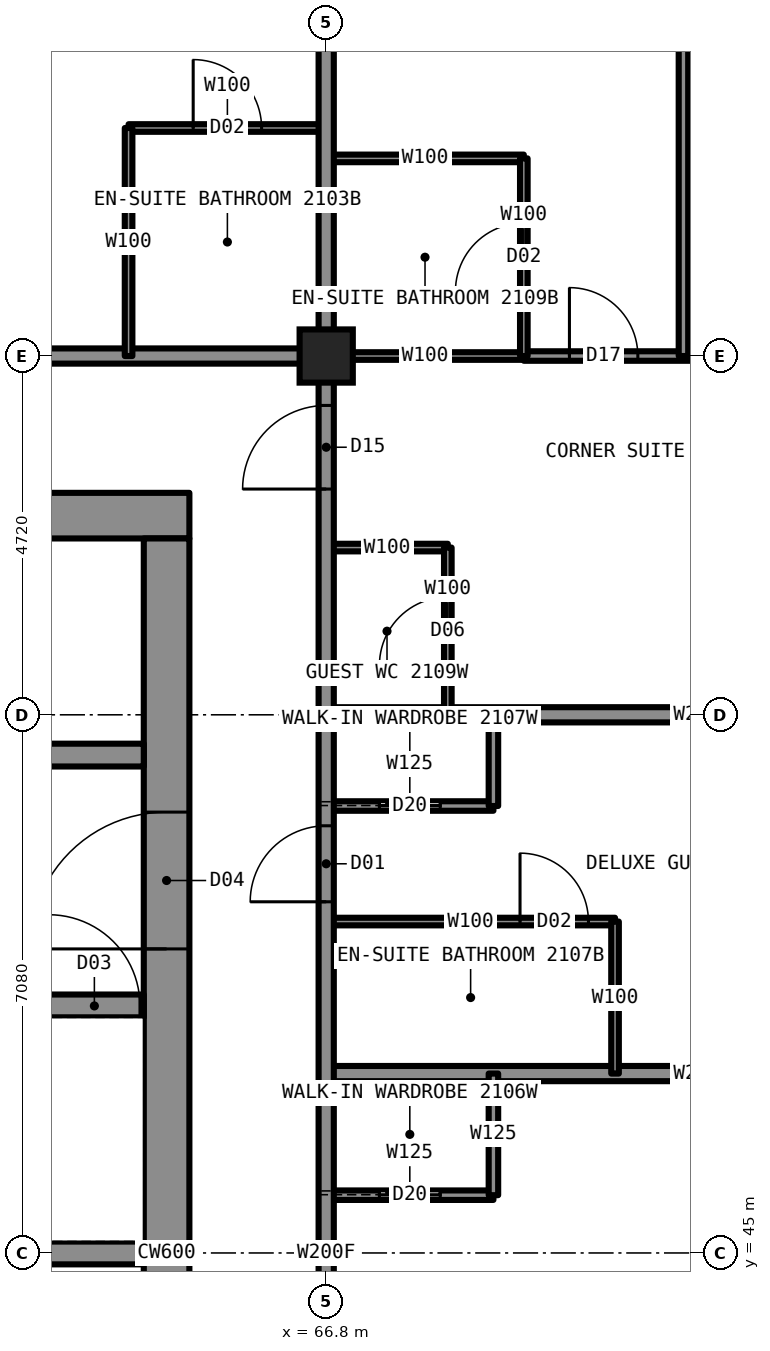
"""IFC4 building model, lengths in metres.
Left out: names, types, materials, properties, quantities, classifications, styles, units other than length and angle.
Written with IfcOpenShell. Run it as: python <this file> out.ifc"""

import sys

from ifc_helpers import new_model, si_unit, direction, frame, frame_2d, origin, origin_2d, place, context, subcontext, project, spatial, rectangle, hollow_rectangle, extrude, element, fill, save


model = new_model("IFC4")
c1 = context("Model", 3, precision=1e-05, world=origin(), true_north=direction((0.0, 1.0)))
c2 = subcontext(c1, "Body", "Model", "MODEL_VIEW")
j1 = project(units=[si_unit("LENGTHUNIT", "METRE"), si_unit("PLANEANGLEUNIT", "RADIAN")], contexts=[c1])
p1 = place(None, origin())
s1 = spatial("IfcSite", under=j1, at=p1, CompositionType="ELEMENT")
p2 = place(p1, origin())
s2 = spatial("IfcBuilding", under=s1, at=p2, CompositionType="ELEMENT")
p3 = place(p2, frame((0.0, 0.0, 81.0)))
s3 = spatial("IfcBuildingStorey", under=s2, at=p3, CompositionType="ELEMENT", Elevation=81.0)
p4 = place(p3, frame((66.8, 56.8, 0.0), z_axis=(0.0, 0.0, 1.0), x_axis=(1.0, 0.0, 0.0)))
e1 = element("IfcColumn", 1, at=p4, inside=s3, PredefinedType="COLUMN", context=c2, shape_type="SweptSolid", body=[
    extrude(hollow_rectangle(XDim=0.7, YDim=0.7, WallThickness=0.06, at=origin_2d()), origin(), (0.0, 0.0, 1.0), 3.5),
])
p5 = place(p3, frame((45.0, 54.7, 0.0), z_axis=(0.0, 0.0, 1.0), x_axis=(1.0, 0.0, 0.0)))
e2 = element("IfcWall", 2, at=p5, inside=s3, PredefinedType="SHEAR", context=c2, shape_type="SweptSolid", body=[
    extrude(rectangle(XDim=20.0, YDim=0.6, at=frame_2d((10.0, 0.0))), origin(), (0.0, 0.0, 1.0), 3.5),
])
p6 = place(p3, frame((64.7, 35.6, 0.0), z_axis=(0.0, 0.0, 1.0), x_axis=(0.0, 1.0, 0.0)))
e3 = element("IfcWall", 3, at=p6, inside=s3, PredefinedType="SHEAR", context=c2, shape_type="SweptSolid", body=[
    extrude(rectangle(XDim=18.8, YDim=0.6, at=frame_2d((9.4, 0.0))), origin(), (0.0, 0.0, 1.0), 3.5),
])
p7 = place(p6, frame((13.4, 0.0, 0.0)))
e4 = element("IfcOpeningElement", 4, at=p7, cuts=e3, PredefinedType="OPENING", context=c2, shape_type="SweptSolid", body=[
    extrude(rectangle(XDim=1.8, YDim=2.2, at=frame_2d((0.9, 1.1))), frame((0.0, 0.31, 0.0), z_axis=(0.0, -1.0, 0.0), x_axis=(1.0, 0.0, 0.0)), (0.0, 0.0, 1.0), 0.62),
])
p8 = place(p6, frame((3.6, 0.0, 0.0)))
e5 = element("IfcOpeningElement", 5, at=p8, cuts=e3, PredefinedType="OPENING", context=c2, shape_type="SweptSolid", body=[
    extrude(rectangle(XDim=1.8, YDim=2.2, at=frame_2d((0.9, 1.1))), frame((0.0, 0.31, 0.0), z_axis=(0.0, -1.0, 0.0), x_axis=(1.0, 0.0, 0.0)), (0.0, 0.0, 1.0), 0.62),
])
p9 = place(p3, frame((45.6, 51.55, 0.0), z_axis=(0.0, 0.0, 1.0), x_axis=(1.0, 0.0, 0.0)))
e6 = element("IfcWall", 6, at=p9, inside=s3, PredefinedType="SHEAR", context=c2, shape_type="SweptSolid", body=[
    extrude(rectangle(XDim=18.8, YDim=0.3, at=frame_2d((9.4, 0.0))), origin(), (0.0, 0.0, 1.0), 3.5),
])
p10 = place(p9, frame((0.7, 0.0, 0.0)))
e7 = element("IfcOpeningElement", 7, at=p10, cuts=e6, PredefinedType="OPENING", context=c2, shape_type="SweptSolid", body=[
    extrude(rectangle(XDim=1.1, YDim=2.2, at=frame_2d((0.55, 1.1))), frame((0.0, 0.16, 0.0), z_axis=(0.0, -1.0, 0.0), x_axis=(1.0, 0.0, 0.0)), (0.0, 0.0, 1.0), 0.32),
])
p11 = place(p9, frame((3.4, 0.0, 0.0)))
e8 = element("IfcOpeningElement", 8, at=p11, cuts=e6, PredefinedType="OPENING", context=c2, shape_type="SweptSolid", body=[
    extrude(rectangle(XDim=1.1, YDim=2.2, at=frame_2d((0.55, 1.1))), frame((0.0, 0.16, 0.0), z_axis=(0.0, -1.0, 0.0), x_axis=(1.0, 0.0, 0.0)), (0.0, 0.0, 1.0), 0.32),
])
p12 = place(p9, frame((6.1, 0.0, 0.0)))
e9 = element("IfcOpeningElement", 9, at=p12, cuts=e6, PredefinedType="OPENING", context=c2, shape_type="SweptSolid", body=[
    extrude(rectangle(XDim=1.1, YDim=2.2, at=frame_2d((0.55, 1.1))), frame((0.0, 0.16, 0.0), z_axis=(0.0, -1.0, 0.0), x_axis=(1.0, 0.0, 0.0)), (0.0, 0.0, 1.0), 0.32),
])
p13 = place(p9, frame((8.8, 0.0, 0.0)))
e10 = element("IfcOpeningElement", 10, at=p13, cuts=e6, PredefinedType="OPENING", context=c2, shape_type="SweptSolid", body=[
    extrude(rectangle(XDim=1.1, YDim=2.2, at=frame_2d((0.55, 1.1))), frame((0.0, 0.16, 0.0), z_axis=(0.0, -1.0, 0.0), x_axis=(1.0, 0.0, 0.0)), (0.0, 0.0, 1.0), 0.32),
])
p14 = place(p9, frame((11.6, 0.0, 0.0)))
e11 = element("IfcOpeningElement", 11, at=p14, cuts=e6, PredefinedType="OPENING", context=c2, shape_type="SweptSolid", body=[
    extrude(rectangle(XDim=1.1, YDim=2.2, at=frame_2d((0.55, 1.1))), frame((0.0, 0.16, 0.0), z_axis=(0.0, -1.0, 0.0), x_axis=(1.0, 0.0, 0.0)), (0.0, 0.0, 1.0), 0.32),
])
p15 = place(p9, frame((14.3, 0.0, 0.0)))
e12 = element("IfcOpeningElement", 12, at=p15, cuts=e6, PredefinedType="OPENING", context=c2, shape_type="SweptSolid", body=[
    extrude(rectangle(XDim=1.1, YDim=2.2, at=frame_2d((0.55, 1.1))), frame((0.0, 0.16, 0.0), z_axis=(0.0, -1.0, 0.0), x_axis=(1.0, 0.0, 0.0)), (0.0, 0.0, 1.0), 0.32),
])
p16 = place(p3, frame((56.2, 48.25, 0.0), z_axis=(0.0, 0.0, 1.0), x_axis=(1.0, 0.0, 0.0)))
e13 = element("IfcWall", 13, at=p16, inside=s3, PredefinedType="SHEAR", context=c2, shape_type="SweptSolid", body=[
    extrude(rectangle(XDim=8.2, YDim=0.3, at=frame_2d((4.1, 0.0))), origin(), (0.0, 0.0, 1.0), 3.5),
])
p17 = place(p16, frame((6.95, 0.0, 0.0)))
e14 = element("IfcOpeningElement", 14, at=p17, cuts=e13, PredefinedType="OPENING", context=c2, shape_type="SweptSolid", body=[
    extrude(rectangle(XDim=1.2, YDim=2.2, at=frame_2d((0.6, 1.1))), frame((0.0, 0.16, 0.0), z_axis=(0.0, -1.0, 0.0), x_axis=(1.0, 0.0, 0.0)), (0.0, 0.0, 1.0), 0.32),
])
p18 = place(p3, frame((56.5, 45.0, 0.0), z_axis=(0.0, 0.0, 1.0), x_axis=(1.0, 0.0, 0.0)))
e15 = element("IfcWall", 15, at=p18, inside=s3, PredefinedType="SHEAR", context=c2, shape_type="SweptSolid", body=[
    extrude(rectangle(XDim=7.9, YDim=0.3, at=frame_2d((3.95, 0.0))), origin(), (0.0, 0.0, 1.0), 3.5),
])
p19 = place(p3, frame((66.8, 45.76, 0.0), z_axis=(0.0, 0.0, 1.0), x_axis=(1.0, 0.0, 0.0)))
e16 = element("IfcWall", 16, at=p19, inside=s3, PredefinedType="PARTITIONING", context=c2, shape_type="SweptSolid", body=[
    extrude(rectangle(XDim=2.2, YDim=0.125, at=frame_2d((1.1, 0.0))), origin(), (0.0, 0.0, 1.0), 3.33),
])
p20 = place(p19, frame((0.7, 0.0, 0.0)))
e17 = element("IfcOpeningElement", 17, at=p20, cuts=e16, PredefinedType="OPENING", context=c2, shape_type="SweptSolid", body=[
    extrude(rectangle(XDim=0.8, YDim=2.1, at=frame_2d((0.4, 1.05))), frame((0.0, 0.073, 0.0), z_axis=(0.0, -1.0, 0.0), x_axis=(1.0, 0.0, 0.0)), (0.0, 0.0, 1.0), 0.145),
])
p21 = place(p3, frame((66.8, 56.8, 0.0), z_axis=(0.0, 0.0, 1.0), x_axis=(1.0, 0.0, 0.0)))
e18 = element("IfcWall", 18, at=p21, inside=s3, PredefinedType="PARTITIONING", context=c2, shape_type="SweptSolid", body=[
    extrude(rectangle(XDim=2.6, YDim=0.1, at=frame_2d((1.3, 0.0))), origin(), (0.0, 0.0, 1.0), 2.573),
])
p22 = place(p3, frame((43.2, 56.8, 0.0), z_axis=(0.0, 0.0, 1.0), x_axis=(1.0, 0.0, 0.0)))
e19 = element("IfcWall", 19, at=p22, inside=s3, PredefinedType="PARTITIONING", context=c2, shape_type="SweptSolid", body=[
    extrude(rectangle(XDim=23.6, YDim=0.2, at=frame_2d((11.8, 0.0))), origin(), (0.0, 0.0, 1.0), 3.33),
])
p23 = place(p22, frame((0.7, 0.0, 0.0)))
e20 = element("IfcOpeningElement", 20, at=p23, cuts=e19, PredefinedType="OPENING", context=c2, shape_type="SweptSolid", body=[
    extrude(rectangle(XDim=1.0, YDim=2.2, at=frame_2d((0.5, 1.1))), frame((0.0, 0.11, 0.0), z_axis=(0.0, -1.0, 0.0), x_axis=(1.0, 0.0, 0.0)), (0.0, 0.0, 1.0), 0.22),
])
p24 = place(p22, frame((6.98, 0.0, 0.0)))
e21 = element("IfcOpeningElement", 21, at=p24, cuts=e19, PredefinedType="OPENING", context=c2, shape_type="SweptSolid", body=[
    extrude(rectangle(XDim=1.0, YDim=2.2, at=frame_2d((0.5, 1.1))), frame((0.0, 0.11, 0.0), z_axis=(0.0, -1.0, 0.0), x_axis=(1.0, 0.0, 0.0)), (0.0, 0.0, 1.0), 0.22),
])
p25 = place(p22, frame((11.29, 0.0, 0.0)))
e22 = element("IfcOpeningElement", 22, at=p25, cuts=e19, PredefinedType="OPENING", context=c2, shape_type="SweptSolid", body=[
    extrude(rectangle(XDim=1.1, YDim=2.2, at=frame_2d((0.55, 1.1))), frame((0.0, 0.11, 0.0), z_axis=(0.0, -1.0, 0.0), x_axis=(1.0, 0.0, 0.0)), (0.0, 0.0, 1.0), 0.22),
])
p26 = place(p3, frame((69.4, 56.8, 0.0), z_axis=(0.0, 0.0, 1.0), x_axis=(1.0, 0.0, 0.0)))
e23 = element("IfcWall", 23, at=p26, inside=s3, PredefinedType="PARTITIONING", context=c2, shape_type="SweptSolid", body=[
    extrude(rectangle(XDim=7.3, YDim=0.125, at=frame_2d((3.65, 0.0))), origin(), (0.0, 0.0, 1.0), 2.573),
])
p27 = place(p26, frame((0.6, 0.0, 0.0)))
e24 = element("IfcOpeningElement", 24, at=p27, cuts=e23, PredefinedType="OPENING", context=c2, shape_type="SweptSolid", body=[
    extrude(rectangle(XDim=0.9, YDim=2.2, at=frame_2d((0.45, 1.1))), frame((0.0, 0.073, 0.0), z_axis=(0.0, -1.0, 0.0), x_axis=(1.0, 0.0, 0.0)), (0.0, 0.0, 1.0), 0.145),
])
p28 = place(p26, frame((4.4, 0.0, 0.0)))
e25 = element("IfcOpeningElement", 25, at=p28, cuts=e23, PredefinedType="OPENING", context=c2, shape_type="SweptSolid", body=[
    extrude(rectangle(XDim=0.9, YDim=2.2, at=frame_2d((0.45, 1.1))), frame((0.0, 0.073, 0.0), z_axis=(0.0, -1.0, 0.0), x_axis=(1.0, 0.0, 0.0)), (0.0, 0.0, 1.0), 0.145),
])
p29 = place(p3, frame((66.8, 59.4, 0.0), z_axis=(0.0, 0.0, 1.0), x_axis=(1.0, 0.0, 0.0)))
e26 = element("IfcWall", 26, at=p29, inside=s3, PredefinedType="PARTITIONING", context=c2, shape_type="SweptSolid", body=[
    extrude(rectangle(XDim=2.6, YDim=0.1, at=frame_2d((1.3, 0.0))), origin(), (0.0, 0.0, 1.0), 3.33),
])
p30 = place(p3, frame((64.2, 59.8, 0.0), z_axis=(0.0, 0.0, 1.0), x_axis=(1.0, 0.0, 0.0)))
e27 = element("IfcWall", 27, at=p30, inside=s3, PredefinedType="PARTITIONING", context=c2, shape_type="SweptSolid", body=[
    extrude(rectangle(XDim=2.6, YDim=0.1, at=frame_2d((1.3, 0.0))), origin(), (0.0, 0.0, 1.0), 3.33),
])
p31 = place(p30, frame((0.85, 0.0, 0.0)))
e28 = element("IfcOpeningElement", 28, at=p31, cuts=e27, PredefinedType="OPENING", context=c2, shape_type="SweptSolid", body=[
    extrude(rectangle(XDim=0.9, YDim=2.1, at=frame_2d((0.45, 1.05))), frame((0.0, 0.06, 0.0), z_axis=(0.0, -1.0, 0.0), x_axis=(1.0, 0.0, 0.0)), (0.0, 0.0, 1.0), 0.12),
])
p32 = place(p3, frame((66.8, 47.36, 0.0), z_axis=(0.0, 0.0, 1.0), x_axis=(1.0, 0.0, 0.0)))
e29 = element("IfcWall", 29, at=p32, inside=s3, PredefinedType="PARTITIONING", context=c2, shape_type="SweptSolid", body=[
    extrude(rectangle(XDim=9.9, YDim=0.2, at=frame_2d((4.95, 0.0))), origin(), (0.0, 0.0, 1.0), 2.723),
])
p33 = place(p3, frame((66.8, 49.36, 0.0), z_axis=(0.0, 0.0, 1.0), x_axis=(1.0, 0.0, 0.0)))
e30 = element("IfcWall", 30, at=p33, inside=s3, PredefinedType="PARTITIONING", context=c2, shape_type="SweptSolid", body=[
    extrude(rectangle(XDim=3.8, YDim=0.1, at=frame_2d((1.9, 0.0))), origin(), (0.0, 0.0, 1.0), 3.33),
])
p34 = place(p33, frame((2.55, 0.0, 0.0)))
e31 = element("IfcOpeningElement", 31, at=p34, cuts=e30, PredefinedType="OPENING", context=c2, shape_type="SweptSolid", body=[
    extrude(rectangle(XDim=0.9, YDim=2.1, at=frame_2d((0.45, 1.05))), frame((0.0, 0.06, 0.0), z_axis=(0.0, -1.0, 0.0), x_axis=(1.0, 0.0, 0.0)), (0.0, 0.0, 1.0), 0.12),
])
p35 = place(p3, frame((66.8, 50.88, 0.0), z_axis=(0.0, 0.0, 1.0), x_axis=(1.0, 0.0, 0.0)))
e32 = element("IfcWall", 32, at=p35, inside=s3, PredefinedType="PARTITIONING", context=c2, shape_type="SweptSolid", body=[
    extrude(rectangle(XDim=2.2, YDim=0.125, at=frame_2d((1.1, 0.0))), origin(), (0.0, 0.0, 1.0), 3.33),
])
p36 = place(p35, frame((0.7, 0.0, 0.0)))
e33 = element("IfcOpeningElement", 33, at=p36, cuts=e32, PredefinedType="OPENING", context=c2, shape_type="SweptSolid", body=[
    extrude(rectangle(XDim=0.8, YDim=2.1, at=frame_2d((0.4, 1.05))), frame((0.0, 0.073, 0.0), z_axis=(0.0, -1.0, 0.0), x_axis=(1.0, 0.0, 0.0)), (0.0, 0.0, 1.0), 0.145),
])
p37 = place(p3, frame((66.8, 52.08, 0.0), z_axis=(0.0, 0.0, 1.0), x_axis=(1.0, 0.0, 0.0)))
e34 = element("IfcWall", 34, at=p37, inside=s3, PredefinedType="PARTITIONING", context=c2, shape_type="SweptSolid", body=[
    extrude(rectangle(XDim=9.9, YDim=0.2, at=frame_2d((4.95, 0.0))), origin(), (0.0, 0.0, 1.0), 2.573),
])
p38 = place(p3, frame((66.8, 54.28, 0.0), z_axis=(0.0, 0.0, 1.0), x_axis=(1.0, 0.0, 0.0)))
e35 = element("IfcWall", 35, at=p38, inside=s3, PredefinedType="PARTITIONING", context=c2, shape_type="SweptSolid", body=[
    extrude(rectangle(XDim=1.6, YDim=0.1, at=frame_2d((0.8, 0.0))), origin(), (0.0, 0.0, 1.0), 2.723),
])
p39 = place(p3, frame((66.8, 33.2, 0.0), z_axis=(0.0, 0.0, 1.0), x_axis=(0.0, 1.0, 0.0)))
e36 = element("IfcWall", 36, at=p39, inside=s3, PredefinedType="PARTITIONING", context=c2, shape_type="SweptSolid", body=[
    extrude(rectangle(XDim=23.6, YDim=0.2, at=frame_2d((11.8, 0.0))), origin(), (0.0, 0.0, 1.0), 3.33),
])
p40 = place(p39, frame((7.72, 0.0, 0.0)))
e37 = element("IfcOpeningElement", 37, at=p40, cuts=e36, PredefinedType="OPENING", context=c2, shape_type="SweptSolid", body=[
    extrude(rectangle(XDim=1.0, YDim=2.2, at=frame_2d((0.5, 1.1))), frame((0.0, 0.11, 0.0), z_axis=(0.0, -1.0, 0.0), x_axis=(1.0, 0.0, 0.0)), (0.0, 0.0, 1.0), 0.22),
])
p41 = place(p39, frame((16.42, 0.0, 0.0)))
e38 = element("IfcOpeningElement", 38, at=p41, cuts=e36, PredefinedType="OPENING", context=c2, shape_type="SweptSolid", body=[
    extrude(rectangle(XDim=1.0, YDim=2.2, at=frame_2d((0.5, 1.1))), frame((0.0, 0.11, 0.0), z_axis=(0.0, -1.0, 0.0), x_axis=(1.0, 0.0, 0.0)), (0.0, 0.0, 1.0), 0.22),
])
p42 = place(p39, frame((21.85, 0.0, 0.0)))
e39 = element("IfcOpeningElement", 39, at=p42, cuts=e36, PredefinedType="OPENING", context=c2, shape_type="SweptSolid", body=[
    extrude(rectangle(XDim=1.1, YDim=2.2, at=frame_2d((0.55, 1.1))), frame((0.0, 0.11, 0.0), z_axis=(0.0, -1.0, 0.0), x_axis=(1.0, 0.0, 0.0)), (0.0, 0.0, 1.0), 0.22),
])
p43 = place(p39, frame((0.66, 0.0, 0.0)))
e40 = element("IfcOpeningElement", 40, at=p43, cuts=e36, PredefinedType="OPENING", context=c2, shape_type="SweptSolid", body=[
    extrude(rectangle(XDim=1.1, YDim=2.2, at=frame_2d((0.55, 1.1))), frame((0.0, 0.11, 0.0), z_axis=(0.0, -1.0, 0.0), x_axis=(1.0, 0.0, 0.0)), (0.0, 0.0, 1.0), 0.22),
])
p44 = place(p3, frame((66.8, 56.8, 0.0), z_axis=(0.0, 0.0, 1.0), x_axis=(0.0, 1.0, 0.0)))
e41 = element("IfcWall", 41, at=p44, inside=s3, PredefinedType="PARTITIONING", context=c2, shape_type="SweptSolid", body=[
    extrude(rectangle(XDim=9.9, YDim=0.2, at=frame_2d((4.95, 0.0))), origin(), (0.0, 0.0, 1.0), 2.573),
])
p45 = place(p3, frame((68.4, 52.08, 0.0), z_axis=(0.0, 0.0, 1.0), x_axis=(0.0, 1.0, 0.0)))
e42 = element("IfcWall", 42, at=p45, inside=s3, PredefinedType="PARTITIONING", context=c2, shape_type="SweptSolid", body=[
    extrude(rectangle(XDim=2.2, YDim=0.1, at=frame_2d((1.1, 0.0))), origin(), (0.0, 0.0, 1.0), 3.33),
])
p46 = place(p45, frame((0.65, 0.0, 0.0)))
e43 = element("IfcOpeningElement", 43, at=p46, cuts=e42, PredefinedType="OPENING", context=c2, shape_type="SweptSolid", body=[
    extrude(rectangle(XDim=0.9, YDim=2.1, at=frame_2d((0.45, 1.05))), frame((0.0, 0.06, 0.0), z_axis=(0.0, -1.0, 0.0), x_axis=(1.0, 0.0, 0.0)), (0.0, 0.0, 1.0), 0.12),
])
p47 = place(p3, frame((69.0, 45.76, 0.0), z_axis=(0.0, 0.0, 1.0), x_axis=(0.0, 1.0, 0.0)))
e44 = element("IfcWall", 44, at=p47, inside=s3, PredefinedType="PARTITIONING", context=c2, shape_type="SweptSolid", body=[
    extrude(rectangle(XDim=1.6, YDim=0.125, at=frame_2d((0.8, 0.0))), origin(), (0.0, 0.0, 1.0), 3.33),
])
p48 = place(p3, frame((69.0, 50.88, 0.0), z_axis=(0.0, 0.0, 1.0), x_axis=(0.0, 1.0, 0.0)))
e45 = element("IfcWall", 45, at=p48, inside=s3, PredefinedType="PARTITIONING", context=c2, shape_type="SweptSolid", body=[
    extrude(rectangle(XDim=1.2, YDim=0.125, at=frame_2d((0.6, 0.0))), origin(), (0.0, 0.0, 1.0), 3.33),
])
p49 = place(p3, frame((69.4, 56.8, 0.0), z_axis=(0.0, 0.0, 1.0), x_axis=(0.0, 1.0, 0.0)))
e46 = element("IfcWall", 46, at=p49, inside=s3, PredefinedType="PARTITIONING", context=c2, shape_type="SweptSolid", body=[
    extrude(rectangle(XDim=2.6, YDim=0.1, at=frame_2d((1.3, 0.0))), origin(), (0.0, 0.0, 1.0), 3.33),
])
p50 = place(p49, frame((0.85, 0.0, 0.0)))
e47 = element("IfcOpeningElement", 47, at=p50, cuts=e46, PredefinedType="OPENING", context=c2, shape_type="SweptSolid", body=[
    extrude(rectangle(XDim=0.9, YDim=2.1, at=frame_2d((0.45, 1.05))), frame((0.0, 0.06, 0.0), z_axis=(0.0, -1.0, 0.0), x_axis=(1.0, 0.0, 0.0)), (0.0, 0.0, 1.0), 0.12),
])
p51 = place(p3, frame((70.6, 47.36, 0.0), z_axis=(0.0, 0.0, 1.0), x_axis=(0.0, 1.0, 0.0)))
e48 = element("IfcWall", 48, at=p51, inside=s3, PredefinedType="PARTITIONING", context=c2, shape_type="SweptSolid", body=[
    extrude(rectangle(XDim=2.0, YDim=0.1, at=frame_2d((1.0, 0.0))), origin(), (0.0, 0.0, 1.0), 3.33),
])
p52 = place(p3, frame((71.5, 56.8, 0.0), z_axis=(0.0, 0.0, 1.0), x_axis=(0.0, 1.0, 0.0)))
e49 = element("IfcWall", 49, at=p52, inside=s3, PredefinedType="PARTITIONING", context=c2, shape_type="SweptSolid", body=[
    extrude(rectangle(XDim=9.894, YDim=0.125, at=frame_2d((4.947, 0.0))), origin(), (0.0, 0.0, 1.0), 3.33),
])
p53 = place(p3, frame((64.2, 56.8, 0.0), z_axis=(0.0, 0.0, 1.0), x_axis=(0.0, 1.0, 0.0)))
e50 = element("IfcWall", 50, at=p53, inside=s3, PredefinedType="PARTITIONING", context=c2, shape_type="SweptSolid", body=[
    extrude(rectangle(XDim=3.0, YDim=0.1, at=frame_2d((1.5, 0.0))), origin(), (0.0, 0.0, 1.0), 3.33),
])
p54 = place(p31, origin())
e51 = element("IfcDoor", 51, at=p54, inside=s3, OperationType="SINGLE_SWING_RIGHT", PredefinedType="DOOR", context=c2, shape_type="SweptSolid", body=[
    extrude(rectangle(XDim=0.9, YDim=2.1, at=frame_2d((0.45, 1.05))), frame((0.0, 0.025, 0.0), z_axis=(0.0, -1.0, 0.0), x_axis=(1.0, 0.0, 0.0)), (0.0, 0.0, 1.0), 0.05),
])
fill(e28, e51)
p55 = place(p20, origin())
e52 = element("IfcDoor", 52, at=p55, inside=s3, OperationType="SLIDING_TO_LEFT", PredefinedType="DOOR", context=c2, shape_type="SweptSolid", body=[
    extrude(rectangle(XDim=0.8, YDim=2.1, at=frame_2d((0.4, 1.05))), frame((0.0, 0.025, 0.0), z_axis=(0.0, -1.0, 0.0), x_axis=(1.0, 0.0, 0.0)), (0.0, 0.0, 1.0), 0.05),
])
fill(e17, e52)
p56 = place(p41, origin())
e53 = element("IfcDoor", 53, at=p56, inside=s3, OperationType="SINGLE_SWING_LEFT", PredefinedType="DOOR", context=c2, shape_type="SweptSolid", body=[
    extrude(rectangle(XDim=1.0, YDim=2.2, at=frame_2d((0.5, 1.1))), frame((0.0, 0.025, 0.0), z_axis=(0.0, -1.0, 0.0), x_axis=(1.0, 0.0, 0.0)), (0.0, 0.0, 1.0), 0.05),
])
fill(e38, e53)
p57 = place(p34, origin())
e54 = element("IfcDoor", 54, at=p57, inside=s3, OperationType="SINGLE_SWING_RIGHT", PredefinedType="DOOR", context=c2, shape_type="SweptSolid", body=[
    extrude(rectangle(XDim=0.9, YDim=2.1, at=frame_2d((0.45, 1.05))), frame((0.0, 0.025, 0.0), z_axis=(0.0, -1.0, 0.0), x_axis=(1.0, 0.0, 0.0)), (0.0, 0.0, 1.0), 0.05),
])
fill(e31, e54)
p58 = place(p36, origin())
e55 = element("IfcDoor", 55, at=p58, inside=s3, OperationType="SLIDING_TO_LEFT", PredefinedType="DOOR", context=c2, shape_type="SweptSolid", body=[
    extrude(rectangle(XDim=0.8, YDim=2.1, at=frame_2d((0.4, 1.05))), frame((0.0, 0.025, 0.0), z_axis=(0.0, -1.0, 0.0), x_axis=(1.0, 0.0, 0.0)), (0.0, 0.0, 1.0), 0.05),
])
fill(e33, e55)
p59 = place(p42, origin())
e56 = element("IfcDoor", 56, at=p59, inside=s3, OperationType="SINGLE_SWING_LEFT", PredefinedType="DOOR", context=c2, shape_type="SweptSolid", body=[
    extrude(rectangle(XDim=1.1, YDim=2.2, at=frame_2d((0.55, 1.1))), frame((0.0, 0.025, 0.0), z_axis=(0.0, -1.0, 0.0), x_axis=(1.0, 0.0, 0.0)), (0.0, 0.0, 1.0), 0.05),
])
fill(e39, e56)
p60 = place(p50, origin())
e57 = element("IfcDoor", 57, at=p60, inside=s3, OperationType="SINGLE_SWING_RIGHT", PredefinedType="DOOR", context=c2, shape_type="SweptSolid", body=[
    extrude(rectangle(XDim=0.9, YDim=2.1, at=frame_2d((0.45, 1.05))), frame((0.0, 0.025, 0.0), z_axis=(0.0, -1.0, 0.0), x_axis=(1.0, 0.0, 0.0)), (0.0, 0.0, 1.0), 0.05),
])
fill(e47, e57)
p61 = place(p27, origin())
e58 = element("IfcDoor", 58, at=p61, inside=s3, OperationType="SINGLE_SWING_LEFT", PredefinedType="DOOR", context=c2, shape_type="SweptSolid", body=[
    extrude(rectangle(XDim=0.9, YDim=2.2, at=frame_2d((0.45, 1.1))), frame((0.0, 0.025, 0.0), z_axis=(0.0, -1.0, 0.0), x_axis=(1.0, 0.0, 0.0)), (0.0, 0.0, 1.0), 0.05),
])
fill(e24, e58)
p62 = place(p46, origin())
e59 = element("IfcDoor", 59, at=p62, inside=s3, OperationType="SINGLE_SWING_LEFT", PredefinedType="DOOR", context=c2, shape_type="SweptSolid", body=[
    extrude(rectangle(XDim=0.9, YDim=2.1, at=frame_2d((0.45, 1.05))), frame((0.0, 0.025, 0.0), z_axis=(0.0, -1.0, 0.0), x_axis=(1.0, 0.0, 0.0)), (0.0, 0.0, 1.0), 0.05),
])
fill(e43, e59)
p63 = place(p7, origin())
e60 = element("IfcDoor", 60, at=p63, inside=s3, OperationType="DOUBLE_DOOR_SINGLE_SWING", PredefinedType="DOOR", context=c2, shape_type="SweptSolid", body=[
    extrude(rectangle(XDim=1.8, YDim=2.2, at=frame_2d((0.9, 1.1))), frame((0.0, 0.025, 0.0), z_axis=(0.0, -1.0, 0.0), x_axis=(1.0, 0.0, 0.0)), (0.0, 0.0, 1.0), 0.05),
])
fill(e4, e60)
p64 = place(p17, origin())
e61 = element("IfcDoor", 61, at=p64, inside=s3, OperationType="SINGLE_SWING_LEFT", PredefinedType="DOOR", context=c2, shape_type="SweptSolid", body=[
    extrude(rectangle(XDim=1.2, YDim=2.2, at=frame_2d((0.6, 1.1))), frame((0.0, 0.025, 0.0), z_axis=(0.0, -1.0, 0.0), x_axis=(1.0, 0.0, 0.0)), (0.0, 0.0, 1.0), 0.05),
])
fill(e14, e61)
save(model, sys.argv[1])
